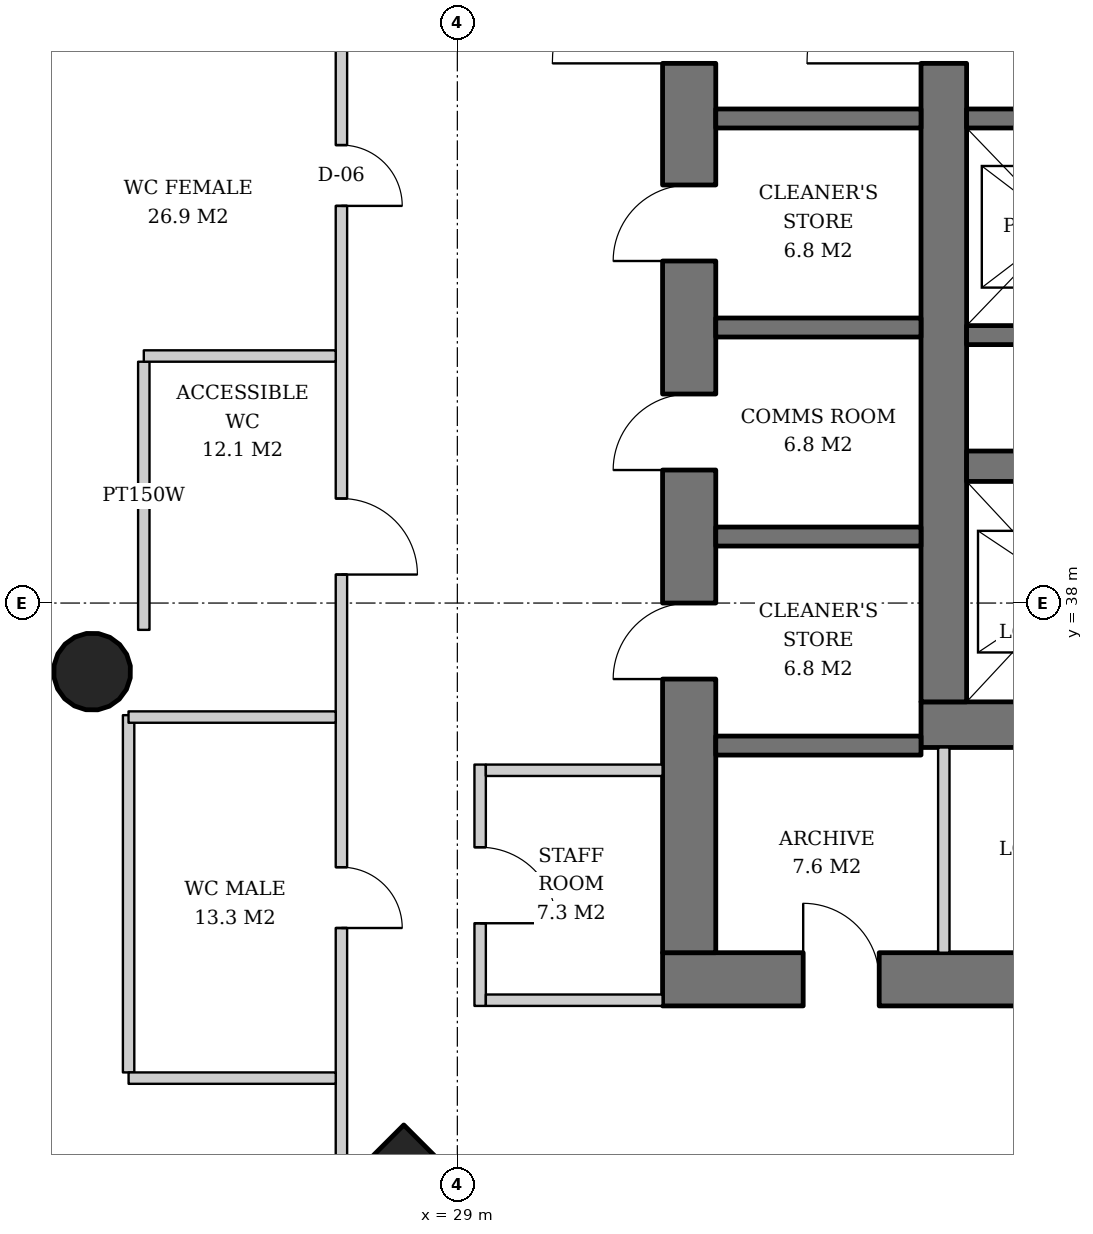
"""IFC4 building model, lengths in metres.
Left out: names, types, materials, properties, quantities, classifications, styles, units other than length and angle.
Written with IfcOpenShell. Run it as: python <this file> out.ifc"""

import sys

from ifc_helpers import new_model, si_unit, direction, frame, frame_2d, origin, origin_2d, place, context, subcontext, project, spatial, rectangle, hollow_circle, extrude, element, fill, save


model = new_model("IFC4")
c1 = context("Model", 3, precision=1e-05, world=origin(), true_north=direction((0.0, 1.0)))
c2 = subcontext(c1, "Body", "Model", "MODEL_VIEW")
j1 = project(units=[si_unit("LENGTHUNIT", "METRE"), si_unit("PLANEANGLEUNIT", "RADIAN")], contexts=[c1])
p1 = place(None, origin())
s1 = spatial("IfcSite", under=j1, at=p1, CompositionType="ELEMENT")
p2 = place(p1, origin())
s2 = spatial("IfcBuilding", under=s1, at=p2, CompositionType="ELEMENT")
p3 = place(p2, frame((0.0, 0.0, 119.8)))
s3 = spatial("IfcBuildingStorey", under=s2, at=p3, CompositionType="ELEMENT", Elevation=119.8)
p4 = place(p3, frame((28.257, 29.257, 0.0), z_axis=(0.031962158256, 0.031962158256, 0.998977898093), x_axis=(-0.707106781187, 0.707106781187, 0.0)))
e1 = element("IfcColumn", 1, at=p4, inside=s3, PredefinedType="COLUMN", context=c2, shape_type="SweptSolid", body=[
    extrude(rectangle(XDim=2.6, YDim=2.6, at=origin_2d()), origin(), (0.0, 0.0, 1.0), 3.804),
])
p5 = place(p3, frame((24.157, 37.079, 0.0), z_axis=(0.031910269556, 0.015987237665, 0.999362868496), x_axis=(-0.447933021895, 0.894067115991, 0.0)))
e2 = element("IfcColumn", 2, at=p5, inside=s3, PredefinedType="COLUMN", context=c2, shape_type="SweptSolid", body=[
    extrude(hollow_circle(Radius=0.508, WallThickness=0.04, at=origin_2d()), origin(), (0.0, 0.0, 1.0), 3.802),
])
p6 = place(p3, frame((35.1, 36.4, 0.0), z_axis=(0.0, 0.0, 1.0), x_axis=(1.0, 0.0, 0.0)))
e3 = element("IfcWall", 3, at=p6, inside=s3, PredefinedType="SHEAR", context=c2, shape_type="SweptSolid", body=[
    extrude(rectangle(XDim=19.8, YDim=0.6, at=frame_2d((9.9, 0.0))), origin(), (0.0, 0.0, 1.0), 3.8),
])
p7 = place(p6, frame((3.9, 0.0, 0.0)))
e4 = element("IfcOpeningElement", 4, at=p7, cuts=e3, PredefinedType="OPENING", context=c2, shape_type="SweptSolid", body=[
    extrude(rectangle(XDim=1.0, YDim=2.1, at=frame_2d((0.5, 1.05))), frame((0.0, 0.31, 0.0), z_axis=(0.0, -1.0, 0.0), x_axis=(1.0, 0.0, 0.0)), (0.0, 0.0, 1.0), 0.62),
])
p8 = place(p6, frame((15.35, 0.0, 0.0)))
e5 = element("IfcOpeningElement", 5, at=p8, cuts=e3, PredefinedType="OPENING", context=c2, shape_type="SweptSolid", body=[
    extrude(rectangle(XDim=1.0, YDim=2.1, at=frame_2d((0.5, 1.05))), frame((0.0, 0.31, 0.0), z_axis=(0.0, -1.0, 0.0), x_axis=(1.0, 0.0, 0.0)), (0.0, 0.0, 1.0), 0.62),
])
p9 = place(p3, frame((35.4, 36.7, 0.0), z_axis=(0.0, 0.0, 1.0), x_axis=(0.0, 1.0, 0.0)))
e6 = element("IfcWall", 6, at=p9, inside=s3, PredefinedType="SHEAR", context=c2, shape_type="SweptSolid", body=[
    extrude(rectangle(XDim=18.6, YDim=0.6, at=frame_2d((9.3, 0.0))), origin(), (0.0, 0.0, 1.0), 3.8),
])
p10 = place(p9, frame((8.4, 0.0, 0.0)))
e7 = element("IfcOpeningElement", 7, at=p10, cuts=e6, PredefinedType="OPENING", context=c2, shape_type="SweptSolid", body=[
    extrude(rectangle(XDim=1.8, YDim=2.4, at=frame_2d((0.9, 1.2))), frame((0.0, 0.31, 0.0), z_axis=(0.0, -1.0, 0.0), x_axis=(1.0, 0.0, 0.0)), (0.0, 0.0, 1.0), 0.62),
])
p11 = place(p3, frame((31.7, 33.05, 0.0), z_axis=(0.0, 0.0, 1.0), x_axis=(1.0, 0.0, 0.0)))
e8 = element("IfcWall", 8, at=p11, inside=s3, PredefinedType="SHEAR", context=c2, shape_type="SweptSolid", body=[
    extrude(rectangle(XDim=26.6, YDim=0.7, at=frame_2d((13.3, 0.0))), origin(), (0.0, 0.0, 1.0), 3.8),
])
p12 = place(p11, frame((7.3, 0.0, 0.0)))
e9 = element("IfcOpeningElement", 9, at=p12, cuts=e8, PredefinedType="OPENING", context=c2, shape_type="SweptSolid", body=[
    extrude(rectangle(XDim=1.0, YDim=2.1, at=frame_2d((0.5, 1.05))), frame((0.0, 0.36, 0.0), z_axis=(0.0, -1.0, 0.0), x_axis=(1.0, 0.0, 0.0)), (0.0, 0.0, 1.0), 0.72),
])
p13 = place(p11, frame((18.75, 0.0, 0.0)))
e10 = element("IfcOpeningElement", 10, at=p13, cuts=e8, PredefinedType="OPENING", context=c2, shape_type="SweptSolid", body=[
    extrude(rectangle(XDim=1.0, YDim=2.1, at=frame_2d((0.5, 1.05))), frame((0.0, 0.36, 0.0), z_axis=(0.0, -1.0, 0.0), x_axis=(1.0, 0.0, 0.0)), (0.0, 0.0, 1.0), 0.72),
])
p14 = place(p11, frame((1.85, 0.0, 0.0)))
e11 = element("IfcOpeningElement", 11, at=p14, cuts=e8, PredefinedType="OPENING", context=c2, shape_type="SweptSolid", body=[
    extrude(rectangle(XDim=1.0, YDim=2.1, at=frame_2d((0.5, 1.05))), frame((0.0, 0.36, 0.0), z_axis=(0.0, -1.0, 0.0), x_axis=(1.0, 0.0, 0.0)), (0.0, 0.0, 1.0), 0.72),
])
p15 = place(p11, frame((4.7, 0.0, 0.0)))
e12 = element("IfcOpeningElement", 12, at=p15, cuts=e8, PredefinedType="OPENING", context=c2, shape_type="SweptSolid", body=[
    extrude(rectangle(XDim=1.0, YDim=2.1, at=frame_2d((0.5, 1.05))), frame((0.0, 0.36, 0.0), z_axis=(0.0, -1.0, 0.0), x_axis=(1.0, 0.0, 0.0)), (0.0, 0.0, 1.0), 0.72),
])
p16 = place(p11, frame((12.44, 0.0, 0.0)))
e13 = element("IfcOpeningElement", 13, at=p16, cuts=e8, PredefinedType="OPENING", context=c2, shape_type="SweptSolid", body=[
    extrude(rectangle(XDim=1.0, YDim=2.1, at=frame_2d((0.5, 1.05))), frame((0.0, 0.36, 0.0), z_axis=(0.0, -1.0, 0.0), x_axis=(1.0, 0.0, 0.0)), (0.0, 0.0, 1.0), 0.72),
])
p17 = place(p11, frame((20.644, 0.0, 0.0)))
e14 = element("IfcOpeningElement", 14, at=p17, cuts=e8, PredefinedType="OPENING", context=c2, shape_type="SweptSolid", body=[
    extrude(rectangle(XDim=1.0, YDim=2.1, at=frame_2d((0.5, 1.05))), frame((0.0, 0.36, 0.0), z_axis=(0.0, -1.0, 0.0), x_axis=(1.0, 0.0, 0.0)), (0.0, 0.0, 1.0), 0.72),
])
p18 = place(p11, frame((23.544, 0.0, 0.0)))
e15 = element("IfcOpeningElement", 15, at=p18, cuts=e8, PredefinedType="OPENING", context=c2, shape_type="SweptSolid", body=[
    extrude(rectangle(XDim=1.0, YDim=2.1, at=frame_2d((0.5, 1.05))), frame((0.0, 0.36, 0.0), z_axis=(0.0, -1.0, 0.0), x_axis=(1.0, 0.0, 0.0)), (0.0, 0.0, 1.0), 0.72),
])
p19 = place(p3, frame((32.05, 33.4, 0.0), z_axis=(0.0, 0.0, 1.0), x_axis=(0.0, 1.0, 0.0)))
e16 = element("IfcWall", 16, at=p19, inside=s3, PredefinedType="SHEAR", context=c2, shape_type="SweptSolid", body=[
    extrude(rectangle(XDim=25.2, YDim=0.7, at=frame_2d((12.6, 0.0))), origin(), (0.0, 0.0, 1.0), 3.8),
])
p20 = place(p19, frame((11.7, 0.0, 0.0)))
e17 = element("IfcOpeningElement", 17, at=p20, cuts=e16, PredefinedType="OPENING", context=c2, shape_type="SweptSolid", body=[
    extrude(rectangle(XDim=1.8, YDim=2.4, at=frame_2d((0.9, 1.2))), frame((0.0, 0.36, 0.0), z_axis=(0.0, -1.0, 0.0), x_axis=(1.0, 0.0, 0.0)), (0.0, 0.0, 1.0), 0.72),
])
p21 = place(p19, frame((3.6, 0.0, 0.0)))
e18 = element("IfcOpeningElement", 18, at=p21, cuts=e16, PredefinedType="OPENING", context=c2, shape_type="SweptSolid", body=[
    extrude(rectangle(XDim=1.0, YDim=2.1, at=frame_2d((0.5, 1.05))), frame((0.0, 0.36, 0.0), z_axis=(0.0, -1.0, 0.0), x_axis=(1.0, 0.0, 0.0)), (0.0, 0.0, 1.0), 0.72),
])
p22 = place(p19, frame((6.35, 0.0, 0.0)))
e19 = element("IfcOpeningElement", 19, at=p22, cuts=e16, PredefinedType="OPENING", context=c2, shape_type="SweptSolid", body=[
    extrude(rectangle(XDim=1.0, YDim=2.1, at=frame_2d((0.5, 1.05))), frame((0.0, 0.36, 0.0), z_axis=(0.0, -1.0, 0.0), x_axis=(1.0, 0.0, 0.0)), (0.0, 0.0, 1.0), 0.72),
])
p23 = place(p19, frame((9.1, 0.0, 0.0)))
e20 = element("IfcOpeningElement", 20, at=p23, cuts=e16, PredefinedType="OPENING", context=c2, shape_type="SweptSolid", body=[
    extrude(rectangle(XDim=1.0, YDim=2.1, at=frame_2d((0.5, 1.05))), frame((0.0, 0.36, 0.0), z_axis=(0.0, -1.0, 0.0), x_axis=(1.0, 0.0, 0.0)), (0.0, 0.0, 1.0), 0.72),
])
p24 = place(p19, frame((15.1, 0.0, 0.0)))
e21 = element("IfcOpeningElement", 21, at=p24, cuts=e16, PredefinedType="OPENING", context=c2, shape_type="SweptSolid", body=[
    extrude(rectangle(XDim=1.0, YDim=2.1, at=frame_2d((0.5, 1.05))), frame((0.0, 0.36, 0.0), z_axis=(0.0, -1.0, 0.0), x_axis=(1.0, 0.0, 0.0)), (0.0, 0.0, 1.0), 0.72),
])
p25 = place(p19, frame((17.85, 0.0, 0.0)))
e22 = element("IfcOpeningElement", 22, at=p25, cuts=e16, PredefinedType="OPENING", context=c2, shape_type="SweptSolid", body=[
    extrude(rectangle(XDim=1.0, YDim=2.1, at=frame_2d((0.5, 1.05))), frame((0.0, 0.36, 0.0), z_axis=(0.0, -1.0, 0.0), x_axis=(1.0, 0.0, 0.0)), (0.0, 0.0, 1.0), 0.72),
])
p26 = place(p3, frame((35.7, 39.8, 0.0), z_axis=(0.0, 0.0, 1.0), x_axis=(1.0, 0.0, 0.0)))
e23 = element("IfcWall", 23, at=p26, inside=s3, PredefinedType="SHEAR", context=c2, shape_type="SweptSolid", body=[
    extrude(rectangle(XDim=18.6, YDim=0.4, at=frame_2d((9.3, 0.0))), origin(), (0.0, 0.0, 1.0), 3.8),
])
p27 = place(p3, frame((35.7, 41.525, 0.0), z_axis=(0.0, 0.0, 1.0), x_axis=(1.0, 0.0, 0.0)))
e24 = element("IfcWall", 24, at=p27, inside=s3, PredefinedType="SHEAR", context=c2, shape_type="SweptSolid", body=[
    extrude(rectangle(XDim=11.0, YDim=0.25, at=frame_2d((5.5, 0.0))), origin(), (0.0, 0.0, 1.0), 3.8),
])
p28 = place(p3, frame((35.7, 44.375, 0.0), z_axis=(0.0, 0.0, 1.0), x_axis=(1.0, 0.0, 0.0)))
e25 = element("IfcWall", 25, at=p28, inside=s3, PredefinedType="SHEAR", context=c2, shape_type="SweptSolid", body=[
    extrude(rectangle(XDim=12.83, YDim=0.25, at=frame_2d((6.415, 0.0))), origin(), (0.0, 0.0, 1.0), 3.8),
])
p29 = place(p28, frame((0.7, 0.0, 0.0)))
e26 = element("IfcOpeningElement", 26, at=p29, cuts=e25, PredefinedType="OPENING", context=c2, shape_type="SweptSolid", body=[
    extrude(rectangle(XDim=1.1, YDim=2.2, at=frame_2d((0.55, 1.1))), frame((0.0, 0.135, 0.0), z_axis=(0.0, -1.0, 0.0), x_axis=(1.0, 0.0, 0.0)), (0.0, 0.0, 1.0), 0.27),
])
p30 = place(p28, frame((3.45, 0.0, 0.0)))
e27 = element("IfcOpeningElement", 27, at=p30, cuts=e25, PredefinedType="OPENING", context=c2, shape_type="SweptSolid", body=[
    extrude(rectangle(XDim=1.1, YDim=2.2, at=frame_2d((0.55, 1.1))), frame((0.0, 0.135, 0.0), z_axis=(0.0, -1.0, 0.0), x_axis=(1.0, 0.0, 0.0)), (0.0, 0.0, 1.0), 0.27),
])
p31 = place(p28, frame((6.2, 0.0, 0.0)))
e28 = element("IfcOpeningElement", 28, at=p31, cuts=e25, PredefinedType="OPENING", context=c2, shape_type="SweptSolid", body=[
    extrude(rectangle(XDim=1.1, YDim=2.2, at=frame_2d((0.55, 1.1))), frame((0.0, 0.135, 0.0), z_axis=(0.0, -1.0, 0.0), x_axis=(1.0, 0.0, 0.0)), (0.0, 0.0, 1.0), 0.27),
])
p32 = place(p28, frame((8.95, 0.0, 0.0)))
e29 = element("IfcOpeningElement", 29, at=p32, cuts=e25, PredefinedType="OPENING", context=c2, shape_type="SweptSolid", body=[
    extrude(rectangle(XDim=1.1, YDim=2.2, at=frame_2d((0.55, 1.1))), frame((0.0, 0.135, 0.0), z_axis=(0.0, -1.0, 0.0), x_axis=(1.0, 0.0, 0.0)), (0.0, 0.0, 1.0), 0.27),
])
p33 = place(p28, frame((11.515, 0.0, 0.0)))
e30 = element("IfcOpeningElement", 30, at=p33, cuts=e25, PredefinedType="OPENING", context=c2, shape_type="SweptSolid", body=[
    extrude(rectangle(XDim=0.8, YDim=2.0, at=frame_2d((0.4, 1.0))), frame((0.0, 0.135, 0.0), z_axis=(0.0, -1.0, 0.0), x_axis=(1.0, 0.0, 0.0)), (0.0, 0.0, 1.0), 0.27),
])
for number, where, z_axis, x_axis in (
    (31, (32.4, 36.125, 0.0), (0.0, 0.0, 1.0), (1.0, 0.0, 0.0)),
    (32, (32.4, 38.875, 0.0), (0.0, 0.0, 1.0), (1.0, 0.0, 0.0)),
    (33, (32.4, 41.625, 0.0), (0.0, 0.0, 1.0), (1.0, 0.0, 0.0)),
    (34, (32.4, 44.375, 0.0), (0.0, 0.0, 1.0), (1.0, 0.0, 0.0)),
):
    element("IfcWall", number, at=place(p3, frame(where, z_axis=z_axis, x_axis=x_axis)), inside=s3, PredefinedType="SHEAR", context=c2, shape_type="SweptSolid", body=[
        extrude(rectangle(XDim=2.7, YDim=0.25, at=frame_2d((1.35, 0.0))), origin(), (0.0, 0.0, 1.0), 3.8),
    ])
p34 = place(p3, frame((35.4, 33.4, 0.0), z_axis=(0.0, 0.0, 1.0), x_axis=(0.0, 1.0, 0.0)))
e35 = element("IfcWall", 35, at=p34, inside=s3, PredefinedType="SOLIDWALL", context=c2, shape_type="SweptSolid", body=[
    extrude(rectangle(XDim=2.7, YDim=0.15, at=frame_2d((1.35, 0.0))), origin(), (0.0, 0.0, 1.0), 3.62),
])
p35 = place(p3, frame((29.3, 35.875, 0.0), z_axis=(0.0, 0.0, 1.0), x_axis=(0.0, -1.0, 0.0)))
e36 = element("IfcWall", 36, at=p35, inside=s3, PredefinedType="PARTITIONING", context=c2, shape_type="SweptSolid", body=[
    extrude(rectangle(XDim=3.175, YDim=0.15, at=frame_2d((1.587, 0.0))), origin(), (0.0, 0.0, 1.0), 2.806),
])
p36 = place(p35, frame((1.087, 0.0, 0.0)))
e37 = element("IfcOpeningElement", 37, at=p36, cuts=e36, PredefinedType="OPENING", context=c2, shape_type="SweptSolid", body=[
    extrude(rectangle(XDim=1.0, YDim=2.1, at=frame_2d((0.5, 1.05))), frame((0.0, 0.085, 0.0), z_axis=(0.0, -1.0, 0.0), x_axis=(1.0, 0.0, 0.0)), (0.0, 0.0, 1.0), 0.17),
])
for number, where, z_axis, x_axis in (
    (38, (31.7, 35.8, 0.0), (0.0, 0.0, 1.0), (-1.0, 0.0, 0.0)),
    (39, (31.7, 32.775, 0.0), (0.0, 0.0, 1.0), (-1.0, 0.0, 0.0)),
):
    element("IfcWall", number, at=place(p3, frame(where, z_axis=z_axis, x_axis=x_axis)), inside=s3, PredefinedType="PARTITIONING", context=c2, shape_type="SweptSolid", body=[
        extrude(rectangle(XDim=2.325, YDim=0.15, at=frame_2d((1.163, 0.0))), origin(), (0.0, 0.0, 1.0), 3.62),
    ])
p37 = place(p3, frame((24.875, 41.175, 0.0), z_axis=(0.0, 0.0, 1.0), x_axis=(0.0, -1.0, 0.0)))
e40 = element("IfcWall", 40, at=p37, inside=s3, PredefinedType="PARTITIONING", context=c2, shape_type="SweptSolid", body=[
    extrude(rectangle(XDim=3.528, YDim=0.15, at=frame_2d((1.764, 0.0))), origin(), (0.0, 0.0, 1.0), 2.806),
])
p38 = place(p3, frame((24.675, 36.525, 0.0), z_axis=(0.0, 0.0, 1.0), x_axis=(0.0, -1.0, 0.0)))
e41 = element("IfcWall", 41, at=p38, inside=s3, PredefinedType="PARTITIONING", context=c2, shape_type="SweptSolid", body=[
    extrude(rectangle(XDim=4.7, YDim=0.15, at=frame_2d((2.35, 0.0))), origin(), (0.0, 0.0, 1.0), 2.806),
])
p39 = place(p3, frame((27.475, 61.612, 0.0), z_axis=(0.0, 0.0, 1.0), x_axis=(0.0, -1.0, 0.0)))
e42 = element("IfcWall", 42, at=p39, inside=s3, PredefinedType="PARTITIONING", context=c2, shape_type="SweptSolid", body=[
    extrude(rectangle(XDim=31.223, YDim=0.15, at=frame_2d((15.612, 0.0))), origin(), (0.0, 0.0, 1.0), 2.72),
])
p40 = place(p39, frame((3.237, 0.0, 0.0)))
e43 = element("IfcOpeningElement", 43, at=p40, cuts=e42, PredefinedType="OPENING", context=c2, shape_type="SweptSolid", body=[
    extrude(rectangle(XDim=1.0, YDim=2.1, at=frame_2d((0.5, 1.05))), frame((0.0, 0.085, 0.0), z_axis=(0.0, -1.0, 0.0), x_axis=(1.0, 0.0, 0.0)), (0.0, 0.0, 1.0), 0.17),
])
p41 = place(p39, frame((7.987, 0.0, 0.0)))
e44 = element("IfcOpeningElement", 44, at=p41, cuts=e42, PredefinedType="OPENING", context=c2, shape_type="SweptSolid", body=[
    extrude(rectangle(XDim=1.0, YDim=2.1, at=frame_2d((0.5, 1.05))), frame((0.0, 0.085, 0.0), z_axis=(0.0, -1.0, 0.0), x_axis=(1.0, 0.0, 0.0)), (0.0, 0.0, 1.0), 0.17),
])
p42 = place(p39, frame((12.737, 0.0, 0.0)))
e45 = element("IfcOpeningElement", 45, at=p42, cuts=e42, PredefinedType="OPENING", context=c2, shape_type="SweptSolid", body=[
    extrude(rectangle(XDim=1.0, YDim=2.1, at=frame_2d((0.5, 1.05))), frame((0.0, 0.085, 0.0), z_axis=(0.0, -1.0, 0.0), x_axis=(1.0, 0.0, 0.0)), (0.0, 0.0, 1.0), 0.17),
])
p43 = place(p39, frame((17.586, 0.0, 0.0)))
e46 = element("IfcOpeningElement", 46, at=p43, cuts=e42, PredefinedType="OPENING", context=c2, shape_type="SweptSolid", body=[
    extrude(rectangle(XDim=0.8, YDim=2.1, at=frame_2d((0.4, 1.05))), frame((0.0, 0.085, 0.0), z_axis=(0.0, -1.0, 0.0), x_axis=(1.0, 0.0, 0.0)), (0.0, 0.0, 1.0), 0.17),
])
p44 = place(p39, frame((22.237, 0.0, 0.0)))
e47 = element("IfcOpeningElement", 47, at=p44, cuts=e42, PredefinedType="OPENING", context=c2, shape_type="SweptSolid", body=[
    extrude(rectangle(XDim=1.0, YDim=2.1, at=frame_2d((0.5, 1.05))), frame((0.0, 0.085, 0.0), z_axis=(0.0, -1.0, 0.0), x_axis=(1.0, 0.0, 0.0)), (0.0, 0.0, 1.0), 0.17),
])
p45 = place(p39, frame((27.086, 0.0, 0.0)))
e48 = element("IfcOpeningElement", 48, at=p45, cuts=e42, PredefinedType="OPENING", context=c2, shape_type="SweptSolid", body=[
    extrude(rectangle(XDim=0.8, YDim=2.1, at=frame_2d((0.4, 1.05))), frame((0.0, 0.085, 0.0), z_axis=(0.0, -1.0, 0.0), x_axis=(1.0, 0.0, 0.0)), (0.0, 0.0, 1.0), 0.17),
])
p46 = place(p3, frame((27.4, 41.25, 0.0), z_axis=(0.0, 0.0, 1.0), x_axis=(-1.0, 0.0, 0.0)))
e49 = element("IfcWall", 49, at=p46, inside=s3, PredefinedType="PARTITIONING", context=c2, shape_type="SweptSolid", body=[
    extrude(rectangle(XDim=2.525, YDim=0.15, at=frame_2d((1.262, 0.0))), origin(), (0.0, 0.0, 1.0), 3.62),
])
p47 = place(p3, frame((27.4, 36.5, 0.0), z_axis=(0.0, 0.0, 1.0), x_axis=(-1.0, 0.0, 0.0)))
e50 = element("IfcWall", 50, at=p47, inside=s3, PredefinedType="PARTITIONING", context=c2, shape_type="SweptSolid", body=[
    extrude(rectangle(XDim=2.726, YDim=0.15, at=frame_2d((1.363, 0.0))), origin(), (0.0, 0.0, 1.0), 3.62),
])
p48 = place(p3, frame((27.4, 31.75, 0.0), z_axis=(0.0, 0.0, 1.0), x_axis=(-1.0, 0.0, 0.0)))
e51 = element("IfcWall", 51, at=p48, inside=s3, PredefinedType="PARTITIONING", context=c2, shape_type="SweptSolid", body=[
    extrude(rectangle(XDim=2.725, YDim=0.15, at=frame_2d((1.362, 0.0))), origin(), (0.0, 0.0, 1.0), 3.62),
])
p49 = place(p10, origin())
e52 = element("IfcDoor", 52, at=p49, inside=s3, OperationType="DOUBLE_DOOR_SINGLE_SWING", PredefinedType="DOOR", context=c2, shape_type="SweptSolid", body=[
    extrude(rectangle(XDim=1.8, YDim=2.4, at=frame_2d((0.9, 1.2))), frame((0.0, 0.025, 0.0), z_axis=(0.0, -1.0, 0.0), x_axis=(1.0, 0.0, 0.0)), (0.0, 0.0, 1.0), 0.05),
])
fill(e7, e52)
p50 = place(p20, origin())
e53 = element("IfcDoor", 53, at=p50, inside=s3, OperationType="DOUBLE_DOOR_SINGLE_SWING", PredefinedType="DOOR", context=c2, shape_type="SweptSolid", body=[
    extrude(rectangle(XDim=1.8, YDim=2.4, at=frame_2d((0.9, 1.2))), frame((0.0, 0.025, 0.0), z_axis=(0.0, -1.0, 0.0), x_axis=(1.0, 0.0, 0.0)), (0.0, 0.0, 1.0), 0.05),
])
fill(e17, e53)
p51 = place(p21, origin())
e54 = element("IfcDoor", 54, at=p51, inside=s3, OperationType="SINGLE_SWING_LEFT", PredefinedType="DOOR", context=c2, shape_type="SweptSolid", body=[
    extrude(rectangle(XDim=1.0, YDim=2.1, at=frame_2d((0.5, 1.05))), frame((0.0, -0.29, 0.0), z_axis=(0.0, -1.0, 0.0), x_axis=(1.0, 0.0, 0.0)), (0.0, 0.0, 1.0), 0.05),
])
fill(e18, e54)
p52 = place(p22, origin())
e55 = element("IfcDoor", 55, at=p52, inside=s3, OperationType="SINGLE_SWING_LEFT", PredefinedType="DOOR", context=c2, shape_type="SweptSolid", body=[
    extrude(rectangle(XDim=1.0, YDim=2.1, at=frame_2d((0.5, 1.05))), frame((0.0, -0.29, 0.0), z_axis=(0.0, -1.0, 0.0), x_axis=(1.0, 0.0, 0.0)), (0.0, 0.0, 1.0), 0.05),
])
fill(e19, e55)
p53 = place(p23, origin())
e56 = element("IfcDoor", 56, at=p53, inside=s3, OperationType="SINGLE_SWING_LEFT", PredefinedType="DOOR", context=c2, shape_type="SweptSolid", body=[
    extrude(rectangle(XDim=1.0, YDim=2.1, at=frame_2d((0.5, 1.05))), frame((0.0, -0.29, 0.0), z_axis=(0.0, -1.0, 0.0), x_axis=(1.0, 0.0, 0.0)), (0.0, 0.0, 1.0), 0.05),
])
fill(e20, e56)
p54 = place(p14, origin())
e57 = element("IfcDoor", 57, at=p54, inside=s3, OperationType="SINGLE_SWING_LEFT", PredefinedType="DOOR", context=c2, shape_type="SweptSolid", body=[
    extrude(rectangle(XDim=1.0, YDim=2.1, at=frame_2d((0.5, 1.05))), frame((0.0, 0.34, 0.0), z_axis=(0.0, -1.0, 0.0), x_axis=(1.0, 0.0, 0.0)), (0.0, 0.0, 1.0), 0.05),
])
fill(e11, e57)
p55 = place(p36, origin())
e58 = element("IfcDoor", 58, at=p55, inside=s3, OperationType="SINGLE_SWING_RIGHT", PredefinedType="DOOR", context=c2, shape_type="SweptSolid", body=[
    extrude(rectangle(XDim=1.0, YDim=2.1, at=frame_2d((0.5, 1.05))), frame((0.0, 0.025, 0.0), z_axis=(0.0, -1.0, 0.0), x_axis=(1.0, 0.0, 0.0)), (0.0, 0.0, 1.0), 0.05),
])
fill(e37, e58)
p56 = place(p43, origin())
e59 = element("IfcDoor", 59, at=p56, inside=s3, OperationType="SINGLE_SWING_RIGHT", PredefinedType="DOOR", context=c2, shape_type="SweptSolid", body=[
    extrude(rectangle(XDim=0.8, YDim=2.1, at=frame_2d((0.4, 1.05))), frame((0.0, 0.025, 0.0), z_axis=(0.0, -1.0, 0.0), x_axis=(1.0, 0.0, 0.0)), (0.0, 0.0, 1.0), 0.05),
])
fill(e46, e59)
p57 = place(p44, origin())
e60 = element("IfcDoor", 60, at=p57, inside=s3, OperationType="SINGLE_SWING_RIGHT", PredefinedType="DOOR", context=c2, shape_type="SweptSolid", body=[
    extrude(rectangle(XDim=1.0, YDim=2.1, at=frame_2d((0.5, 1.05))), frame((0.0, 0.025, 0.0), z_axis=(0.0, -1.0, 0.0), x_axis=(1.0, 0.0, 0.0)), (0.0, 0.0, 1.0), 0.05),
])
fill(e47, e60)
p58 = place(p45, origin())
e61 = element("IfcDoor", 61, at=p58, inside=s3, OperationType="SINGLE_SWING_RIGHT", PredefinedType="DOOR", context=c2, shape_type="SweptSolid", body=[
    extrude(rectangle(XDim=0.8, YDim=2.1, at=frame_2d((0.4, 1.05))), frame((0.0, 0.025, 0.0), z_axis=(0.0, -1.0, 0.0), x_axis=(1.0, 0.0, 0.0)), (0.0, 0.0, 1.0), 0.05),
])
fill(e48, e61)
save(model, sys.argv[1])
